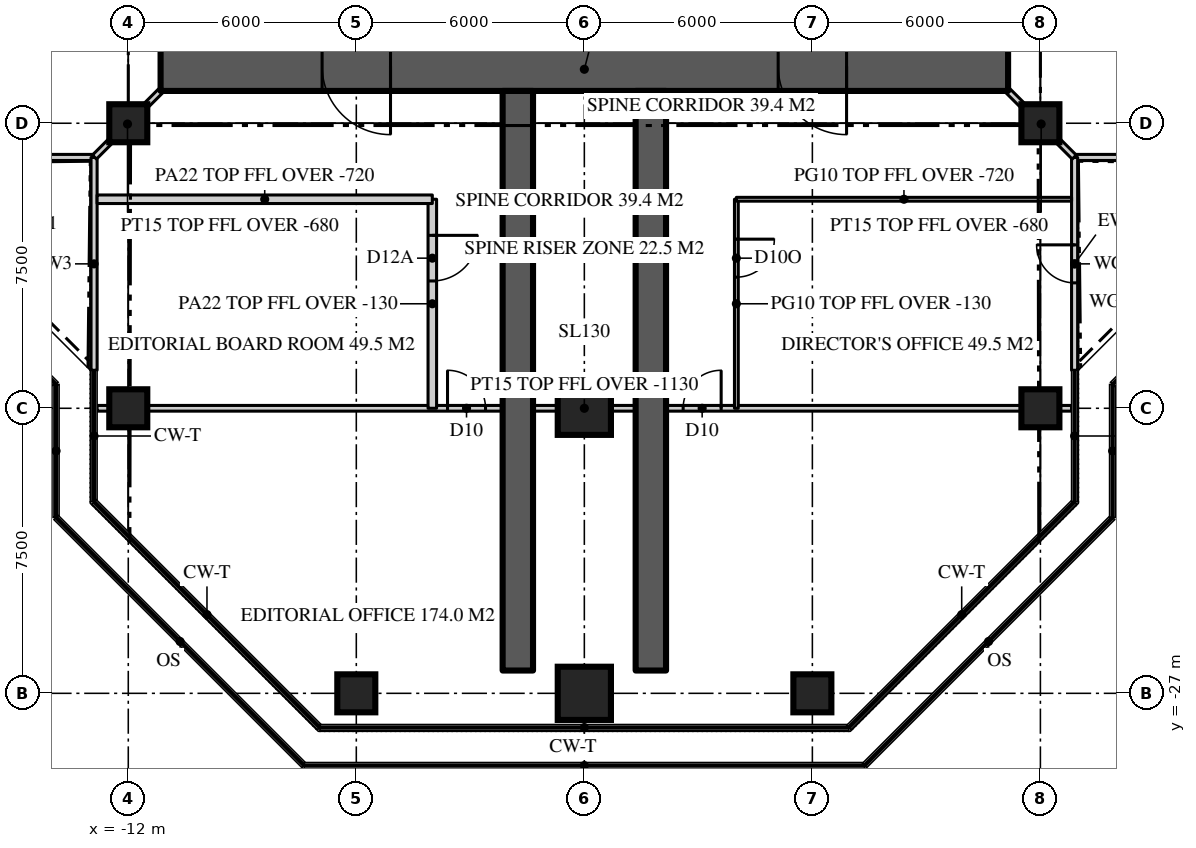
"""IFC4 building model, lengths in metres.
Left out: names, types, materials, properties, quantities, classifications, styles, units other than length and angle.
Written with IfcOpenShell. Run it as: python <this file> out.ifc"""

import sys

from ifc_helpers import new_model, si_unit, direction, frame, frame_2d, origin, origin_2d, place, context, subcontext, project, spatial, rectangle, extrude, element, fill, save


model = new_model("IFC4")
c1 = context("Model", 3, precision=1e-05, world=origin(), true_north=direction((0.0, 1.0)))
c2 = subcontext(c1, "Body", "Model", "MODEL_VIEW")
j1 = project(units=[si_unit("LENGTHUNIT", "METRE"), si_unit("PLANEANGLEUNIT", "RADIAN")], contexts=[c1])
p1 = place(None, origin())
s1 = spatial("IfcSite", under=j1, at=p1, CompositionType="ELEMENT")
p2 = place(p1, origin())
s2 = spatial("IfcBuilding", under=s1, at=p2, CompositionType="ELEMENT")
p3 = place(p2, frame((0.0, 0.0, 279.0)))
s3 = spatial("IfcBuildingStorey", under=s2, at=p3, CompositionType="ELEMENT", Elevation=279.0)
p4 = place(p3, frame((11.15, -10.5, 0.0), z_axis=(0.0, 0.0, 1.0), x_axis=(-1.0, 0.0, 0.0)))
e1 = element("IfcWall", 1, at=p4, inside=s3, PredefinedType="SHEAR", context=c2, shape_type="SweptSolid", body=[
    extrude(rectangle(XDim=22.3, YDim=1.3, at=frame_2d((11.15, 0.0))), origin(), (0.0, 0.0, 1.0), 3.9),
])
p5 = place(p4, frame((16.25, 0.0, 0.0)))
e2 = element("IfcOpeningElement", 2, at=p5, cuts=e1, PredefinedType="OPENING", context=c2, shape_type="SweptSolid", body=[
    extrude(rectangle(XDim=1.8, YDim=2.2, at=frame_2d((0.9, 1.1))), frame((0.0, 0.66, 0.0), z_axis=(0.0, -1.0, 0.0), x_axis=(1.0, 0.0, 0.0)), (0.0, 0.0, 1.0), 1.32),
])
p6 = place(p4, frame((4.25, 0.0, 0.0)))
e3 = element("IfcOpeningElement", 3, at=p6, cuts=e1, PredefinedType="OPENING", context=c2, shape_type="SweptSolid", body=[
    extrude(rectangle(XDim=1.8, YDim=2.2, at=frame_2d((0.9, 1.1))), frame((0.0, 0.66, 0.0), z_axis=(0.0, -1.0, 0.0), x_axis=(1.0, 0.0, 0.0)), (0.0, 0.0, 1.0), 1.32),
])
for number, where, z_axis, x_axis in (
    (4, (-1.75, -11.15, 0.0), (0.0, 0.0, 1.0), (0.0, -1.0, 0.0)),
    (5, (1.75, -11.15, 0.0), (0.0, 0.0, 1.0), (0.0, -1.0, 0.0)),
):
    element("IfcWall", number, at=place(p3, frame(where, z_axis=z_axis, x_axis=x_axis)), inside=s3, PredefinedType="SHEAR", context=c2, shape_type="SweptSolid", body=[
        extrude(rectangle(XDim=15.25, YDim=0.8, at=frame_2d((7.625, 0.0))), origin(), (0.0, 0.0, 1.0), 3.9),
    ])
p7 = place(p3, frame((-6.0, -27.0, 0.0), z_axis=(0.0, 0.0, 1.0), x_axis=(1.0, 0.0, 0.0)))
e6 = element("IfcColumn", 6, at=p7, inside=s3, PredefinedType="COLUMN", context=c2, shape_type="SweptSolid", body=[
    extrude(rectangle(XDim=1.0, YDim=1.0, at=origin_2d()), origin(), (0.0, 0.0, 1.0), 3.9),
])
p8 = place(p3, frame((0.0, -27.0, 0.0), z_axis=(0.0, 0.0, 1.0), x_axis=(1.0, 0.0, 0.0)))
e7 = element("IfcColumn", 7, at=p8, inside=s3, PredefinedType="COLUMN", context=c2, shape_type="SweptSolid", body=[
    extrude(rectangle(XDim=1.4, YDim=1.4, at=origin_2d()), origin(), (0.0, 0.0, 1.0), 3.9),
])
for number, where, z_axis, x_axis in (
    (8, (6.0, -27.0, 0.0), (0.0, 0.0, 1.0), (1.0, 0.0, 0.0)),
    (9, (-12.0, -19.5, 0.0), (0.0, 0.0, 1.0), (1.0, 0.0, 0.0)),
):
    element("IfcColumn", number, at=place(p3, frame(where, z_axis=z_axis, x_axis=x_axis)), inside=s3, PredefinedType="COLUMN", context=c2, shape_type="SweptSolid", body=[
        extrude(rectangle(XDim=1.0, YDim=1.0, at=origin_2d()), origin(), (0.0, 0.0, 1.0), 3.9),
    ])
p9 = place(p3, frame((0.0, -19.5, 0.0), z_axis=(0.0, 0.0, 1.0), x_axis=(1.0, 0.0, 0.0)))
e10 = element("IfcColumn", 10, at=p9, inside=s3, PredefinedType="COLUMN", context=c2, shape_type="SweptSolid", body=[
    extrude(rectangle(XDim=1.4, YDim=1.4, at=origin_2d()), origin(), (0.0, 0.0, 1.0), 3.9),
])
for number, where, z_axis, x_axis in (
    (11, (12.0, -19.5, 0.0), (0.0, 0.0, 1.0), (1.0, 0.0, 0.0)),
    (12, (-12.0, -12.0, 0.0), (0.0, 0.0, 1.0), (1.0, 0.0, 0.0)),
    (13, (12.0, -12.0, 0.0), (0.0, 0.0, 1.0), (1.0, 0.0, 0.0)),
):
    element("IfcColumn", number, at=place(p3, frame(where, z_axis=z_axis, x_axis=x_axis)), inside=s3, PredefinedType="COLUMN", context=c2, shape_type="SweptSolid", body=[
        extrude(rectangle(XDim=1.0, YDim=1.0, at=origin_2d()), origin(), (0.0, 0.0, 1.0), 3.9),
    ])
p10 = place(p3, frame((12.9, -12.9, 0.0), z_axis=(0.0, 0.0, 1.0), x_axis=(1.0, 0.0, 0.0)))
e14 = element("IfcWall", 14, at=p10, inside=s3, PredefinedType="SOLIDWALL", context=c2, shape_type="SweptSolid", body=[
    extrude(rectangle(XDim=5.6, YDim=0.16, at=frame_2d((2.8, 0.0))), origin(), (0.0, 0.0, 1.0), 3.77),
])
p11 = place(p3, frame((-18.5, -12.9, 0.0), z_axis=(0.0, 0.0, 1.0), x_axis=(1.0, 0.0, 0.0)))
e15 = element("IfcWall", 15, at=p11, inside=s3, PredefinedType="SOLIDWALL", context=c2, shape_type="SweptSolid", body=[
    extrude(rectangle(XDim=5.6, YDim=0.16, at=frame_2d((2.8, 0.0))), origin(), (0.0, 0.0, 1.0), 3.77),
])
p12 = place(p11, frame((2.3, 0.0, 0.0)))
e16 = element("IfcOpeningElement", 16, at=p12, cuts=e15, PredefinedType="OPENING", context=c2, shape_type="SweptSolid", body=[
    extrude(rectangle(XDim=1.0, YDim=2.2, at=frame_2d((0.5, 1.1))), frame((0.0, 0.09, 0.0), z_axis=(0.0, -1.0, 0.0), x_axis=(1.0, 0.0, 0.0)), (0.0, 0.0, 1.0), 0.18),
])
p13 = place(p3, frame((-12.9, -12.9, 0.0), z_axis=(0.0, 0.0, 1.0), x_axis=(0.0, -1.0, 0.0)))
e17 = element("IfcWall", 17, at=p13, inside=s3, PredefinedType="SOLIDWALL", context=c2, shape_type="SweptSolid", body=[
    extrude(rectangle(XDim=5.6, YDim=0.16, at=frame_2d((2.8, 0.0))), origin(), (0.0, 0.0, 1.0), 3.77),
])
p14 = place(p3, frame((12.9, -18.5, 0.0), z_axis=(0.0, 0.0, 1.0), x_axis=(0.0, 1.0, 0.0)))
e18 = element("IfcWall", 18, at=p14, inside=s3, PredefinedType="SOLIDWALL", context=c2, shape_type="SweptSolid", body=[
    extrude(rectangle(XDim=5.6, YDim=0.16, at=frame_2d((2.8, 0.0))), origin(), (0.0, 0.0, 1.0), 3.77),
])
p15 = place(p14, frame((2.3, 0.0, 0.0)))
e19 = element("IfcOpeningElement", 19, at=p15, cuts=e18, PredefinedType="OPENING", context=c2, shape_type="SweptSolid", body=[
    extrude(rectangle(XDim=1.0, YDim=2.2, at=frame_2d((0.5, 1.1))), frame((0.0, 0.09, 0.0), z_axis=(0.0, -1.0, 0.0), x_axis=(1.0, 0.0, 0.0)), (0.0, 0.0, 1.0), 0.18),
])
p16 = place(p3, frame((-12.82, -19.5, 0.0), z_axis=(0.0, 0.0, 1.0), x_axis=(1.0, 0.0, 0.0)))
e20 = element("IfcWall", 20, at=p16, inside=s3, PredefinedType="PARTITIONING", context=c2, shape_type="SweptSolid", body=[
    extrude(rectangle(XDim=25.64, YDim=0.15, at=frame_2d((12.82, 0.0))), origin(), (0.0, 0.0, 1.0), 2.77),
])
p17 = place(p16, frame((15.42, 0.0, 0.0)))
e21 = element("IfcOpeningElement", 21, at=p17, cuts=e20, PredefinedType="OPENING", context=c2, shape_type="SweptSolid", body=[
    extrude(rectangle(XDim=1.0, YDim=2.2, at=frame_2d((0.5, 1.1))), frame((0.0, 0.085, 0.0), z_axis=(0.0, -1.0, 0.0), x_axis=(1.0, 0.0, 0.0)), (0.0, 0.0, 1.0), 0.17),
])
p18 = place(p16, frame((9.22, 0.0, 0.0)))
e22 = element("IfcOpeningElement", 22, at=p18, cuts=e20, PredefinedType="OPENING", context=c2, shape_type="SweptSolid", body=[
    extrude(rectangle(XDim=1.0, YDim=2.2, at=frame_2d((0.5, 1.1))), frame((0.0, 0.085, 0.0), z_axis=(0.0, -1.0, 0.0), x_axis=(1.0, 0.0, 0.0)), (0.0, 0.0, 1.0), 0.17),
])
p19 = place(p3, frame((4.0, -14.0, 0.0), z_axis=(0.0, 0.0, 1.0), x_axis=(0.0, -1.0, 0.0)))
e23 = element("IfcWall", 23, at=p19, inside=s3, PredefinedType="PARTITIONING", context=c2, shape_type="SweptSolid", body=[
    extrude(rectangle(XDim=5.5, YDim=0.1, at=frame_2d((2.75, 0.0))), origin(), (0.0, 0.0, 1.0), 3.77),
])
p20 = place(p19, frame((1.05, 0.0, 0.0)))
e24 = element("IfcOpeningElement", 24, at=p20, cuts=e23, PredefinedType="OPENING", context=c2, shape_type="SweptSolid", body=[
    extrude(rectangle(XDim=1.0, YDim=2.2, at=frame_2d((0.5, 1.1))), frame((0.0, 0.06, 0.0), z_axis=(0.0, -1.0, 0.0), x_axis=(1.0, 0.0, 0.0)), (0.0, 0.0, 1.0), 0.12),
])
p21 = place(p3, frame((4.0, -14.0, 0.0), z_axis=(0.0, 0.0, 1.0), x_axis=(1.0, 0.0, 0.0)))
e25 = element("IfcWall", 25, at=p21, inside=s3, PredefinedType="PARTITIONING", context=c2, shape_type="SweptSolid", body=[
    extrude(rectangle(XDim=8.82, YDim=0.1, at=frame_2d((4.41, 0.0))), origin(), (0.0, 0.0, 1.0), 3.18),
])
p22 = place(p3, frame((-4.0, -14.0, 0.0), z_axis=(0.0, 0.0, 1.0), x_axis=(0.0, -1.0, 0.0)))
e26 = element("IfcWall", 26, at=p22, inside=s3, PredefinedType="PARTITIONING", context=c2, shape_type="SweptSolid", body=[
    extrude(rectangle(XDim=5.5, YDim=0.225, at=frame_2d((2.75, 0.0))), origin(), (0.0, 0.0, 1.0), 3.77),
])
p23 = place(p22, frame((0.95, 0.0, 0.0)))
e27 = element("IfcOpeningElement", 27, at=p23, cuts=e26, PredefinedType="OPENING", context=c2, shape_type="SweptSolid", body=[
    extrude(rectangle(XDim=1.2, YDim=2.2, at=frame_2d((0.6, 1.1))), frame((0.0, 0.123, 0.0), z_axis=(0.0, -1.0, 0.0), x_axis=(1.0, 0.0, 0.0)), (0.0, 0.0, 1.0), 0.245),
])
p24 = place(p3, frame((-4.0, -14.0, 0.0), z_axis=(0.0, 0.0, 1.0), x_axis=(-1.0, 0.0, 0.0)))
e28 = element("IfcWall", 28, at=p24, inside=s3, PredefinedType="PARTITIONING", context=c2, shape_type="SweptSolid", body=[
    extrude(rectangle(XDim=8.82, YDim=0.225, at=frame_2d((4.41, 0.0))), origin(), (0.0, 0.0, 1.0), 3.18),
])
for number, where, z_axis, x_axis in (
    (29, (-11.15, -11.15, 0.0), (0.0, 0.0, 1.0), (-0.707, -0.707, 0.0)),
    (30, (11.15, -11.15, 0.0), (0.0, 0.0, 1.0), (0.707, -0.707, 0.0)),
):
    element("IfcWall", number, at=place(p3, frame(where, z_axis=z_axis, x_axis=x_axis)), inside=s3, PredefinedType="PARTITIONING", context=c2, shape_type="SweptSolid", body=[
        extrude(rectangle(XDim=2.461, YDim=0.15, at=frame_2d((1.23, 0.0))), origin(), (0.0, 0.0, 1.0), 3.22),
    ])
p25 = place(p15, origin())
e31 = element("IfcDoor", 31, at=p25, inside=s3, OperationType="SINGLE_SWING_RIGHT", PredefinedType="DOOR", context=c2, shape_type="SweptSolid", body=[
    extrude(rectangle(XDim=1.0, YDim=2.2, at=frame_2d((0.5, 1.1))), frame((0.0, 0.025, 0.0), z_axis=(0.0, -1.0, 0.0), x_axis=(1.0, 0.0, 0.0)), (0.0, 0.0, 1.0), 0.05),
])
fill(e19, e31)
p26 = place(p5, origin())
e32 = element("IfcDoor", 32, at=p26, inside=s3, OperationType="DOUBLE_DOOR_DOUBLE_SWING", PredefinedType="DOOR", context=c2, shape_type="SweptSolid", body=[
    extrude(rectangle(XDim=1.8, YDim=2.2, at=frame_2d((0.9, 1.1))), frame((0.0, 0.025, 0.0), z_axis=(0.0, -1.0, 0.0), x_axis=(1.0, 0.0, 0.0)), (0.0, 0.0, 1.0), 0.05),
])
fill(e2, e32)
p27 = place(p6, origin())
e33 = element("IfcDoor", 33, at=p27, inside=s3, OperationType="DOUBLE_DOOR_DOUBLE_SWING", PredefinedType="DOOR", context=c2, shape_type="SweptSolid", body=[
    extrude(rectangle(XDim=1.8, YDim=2.2, at=frame_2d((0.9, 1.1))), frame((0.0, 0.025, 0.0), z_axis=(0.0, -1.0, 0.0), x_axis=(1.0, 0.0, 0.0)), (0.0, 0.0, 1.0), 0.05),
])
fill(e3, e33)
p28 = place(p17, origin())
e34 = element("IfcDoor", 34, at=p28, inside=s3, OperationType="SINGLE_SWING_RIGHT", PredefinedType="DOOR", context=c2, shape_type="SweptSolid", body=[
    extrude(rectangle(XDim=1.0, YDim=2.2, at=frame_2d((0.5, 1.1))), frame((0.0, 0.025, 0.0), z_axis=(0.0, -1.0, 0.0), x_axis=(1.0, 0.0, 0.0)), (0.0, 0.0, 1.0), 0.05),
])
fill(e21, e34)
p29 = place(p18, origin())
e35 = element("IfcDoor", 35, at=p29, inside=s3, OperationType="SINGLE_SWING_LEFT", PredefinedType="DOOR", context=c2, shape_type="SweptSolid", body=[
    extrude(rectangle(XDim=1.0, YDim=2.2, at=frame_2d((0.5, 1.1))), frame((0.0, 0.025, 0.0), z_axis=(0.0, -1.0, 0.0), x_axis=(1.0, 0.0, 0.0)), (0.0, 0.0, 1.0), 0.05),
])
fill(e22, e35)
p30 = place(p20, origin())
e36 = element("IfcDoor", 36, at=p30, inside=s3, OperationType="SINGLE_SWING_LEFT", PredefinedType="DOOR", context=c2, shape_type="SweptSolid", body=[
    extrude(rectangle(XDim=1.0, YDim=2.2, at=frame_2d((0.5, 1.1))), frame((0.0, 0.025, 0.0), z_axis=(0.0, -1.0, 0.0), x_axis=(1.0, 0.0, 0.0)), (0.0, 0.0, 1.0), 0.05),
])
fill(e24, e36)
p31 = place(p23, origin())
e37 = element("IfcDoor", 37, at=p31, inside=s3, OperationType="SINGLE_SWING_LEFT", PredefinedType="DOOR", context=c2, shape_type="SweptSolid", body=[
    extrude(rectangle(XDim=1.2, YDim=2.2, at=frame_2d((0.6, 1.1))), frame((0.0, 0.025, 0.0), z_axis=(0.0, -1.0, 0.0), x_axis=(1.0, 0.0, 0.0)), (0.0, 0.0, 1.0), 0.05),
])
fill(e27, e37)
save(model, sys.argv[1])
